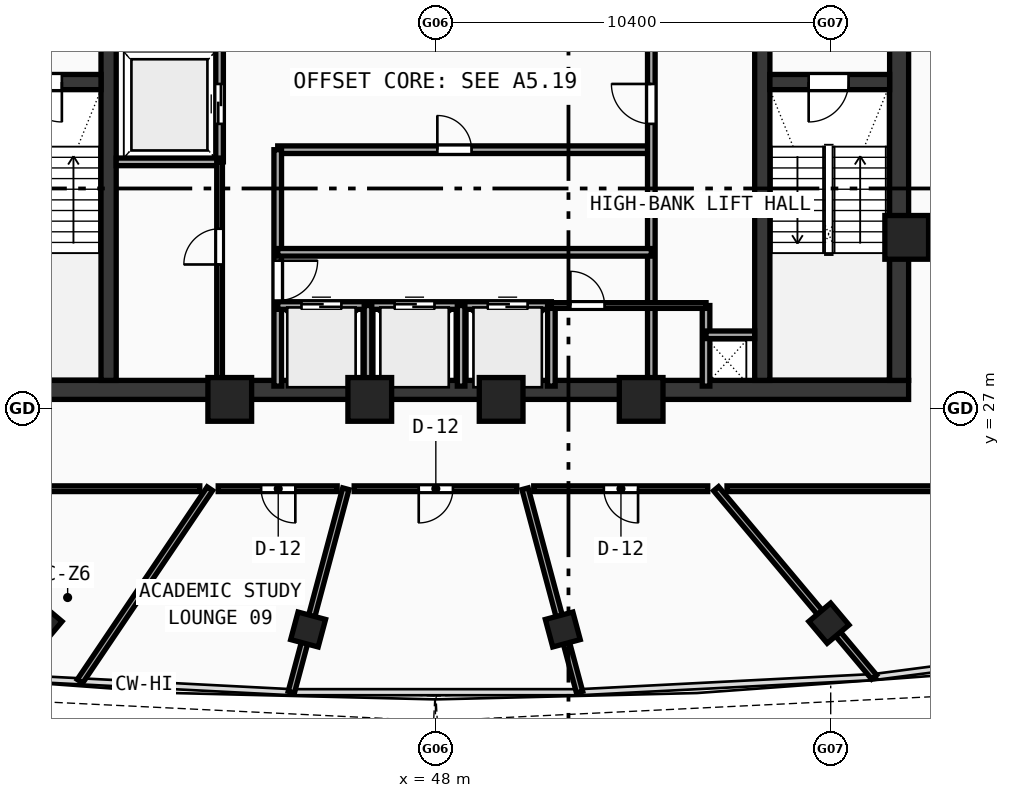
"""IFC4 building model, lengths in metres.
Left out: names, types, materials, properties, quantities, classifications, styles, units other than length and angle.
Written with IfcOpenShell. Run it as: python <this file> out.ifc"""

import sys

from ifc_helpers import new_model, si_unit, direction, frame, frame_2d, origin, origin_with_axes, origin_2d, place, context, subcontext, project, spatial, rectangle, hollow_rectangle, extrude, source, transform, mapped, element, fill, save


model = new_model("IFC4")
c1 = context("Model", 3, precision=1e-05, world=origin(), true_north=direction((0.0, 1.0)))
c2 = subcontext(c1, "Body", "Model", "MODEL_VIEW")
j1 = project(units=[si_unit("LENGTHUNIT", "METRE"), si_unit("PLANEANGLEUNIT", "RADIAN")], contexts=[c1])
p1 = place(None, origin())
s1 = spatial("IfcSite", under=j1, at=p1, CompositionType="ELEMENT")
p2 = place(p1, origin())
s2 = spatial("IfcBuilding", under=s1, at=p2, CompositionType="ELEMENT")
p3 = place(p2, frame((0.0, 0.0, 299.94)))
s3 = spatial("IfcBuildingStorey", under=s2, at=p3, CompositionType="ELEMENT", Elevation=299.94)
p4 = place(p3, frame((35.55, 27.5, 0.0), z_axis=(0.0, 0.0, 1.0), x_axis=(1.0, 0.0, 0.0)))
e1 = element("IfcWall", 1, at=p4, inside=s3, PredefinedType="SHEAR", context=c2, shape_type="SweptSolid", body=[
    extrude(rectangle(XDim=24.9, YDim=0.5, at=frame_2d((12.45, 0.0))), origin(), (0.0, 0.0, 1.0), 3.47),
])
p5 = place(p3, frame((60.2, 27.75, 0.0), z_axis=(0.0, 0.0, 1.0), x_axis=(0.0, 1.0, 0.0)))
e2 = element("IfcWall", 2, at=p5, inside=s3, PredefinedType="SHEAR", context=c2, shape_type="SweptSolid", body=[
    extrude(rectangle(XDim=12.2, YDim=0.5, at=frame_2d((6.1, 0.0))), origin(), (0.0, 0.0, 1.0), 3.47),
])
p6 = place(p3, frame((39.4, 27.75, 0.0), z_axis=(0.0, 0.0, 1.0), x_axis=(0.0, 1.0, 0.0)))
e3 = element("IfcWall", 3, at=p6, inside=s3, PredefinedType="SHEAR", context=c2, shape_type="SweptSolid", body=[
    extrude(rectangle(XDim=12.2, YDim=0.4, at=frame_2d((6.1, 0.0))), origin(), (0.0, 0.0, 1.0), 3.47),
])
p7 = place(p6, frame((10.0, 0.0, 0.0)))
e4 = element("IfcOpeningElement", 4, at=p7, cuts=e3, PredefinedType="OPENING", context=c2, shape_type="SweptSolid", body=[
    extrude(rectangle(XDim=1.1, YDim=2.1, at=frame_2d((0.55, 1.05))), frame((0.0, 0.21, 0.0), z_axis=(0.0, -1.0, 0.0), x_axis=(1.0, 0.0, 0.0)), (0.0, 0.0, 1.0), 0.42),
])
p8 = place(p3, frame((56.6, 27.75, 0.0), z_axis=(0.0, 0.0, 1.0), x_axis=(0.0, 1.0, 0.0)))
e5 = element("IfcWall", 5, at=p8, inside=s3, PredefinedType="SHEAR", context=c2, shape_type="SweptSolid", body=[
    extrude(rectangle(XDim=12.2, YDim=0.4, at=frame_2d((6.1, 0.0))), origin(), (0.0, 0.0, 1.0), 3.47),
])
p9 = place(p8, frame((10.0, 0.0, 0.0)))
e6 = element("IfcOpeningElement", 6, at=p9, cuts=e5, PredefinedType="OPENING", context=c2, shape_type="SweptSolid", body=[
    extrude(rectangle(XDim=1.1, YDim=2.1, at=frame_2d((0.55, 1.05))), frame((0.0, 0.21, 0.0), z_axis=(0.0, -1.0, 0.0), x_axis=(1.0, 0.0, 0.0)), (0.0, 0.0, 1.0), 0.42),
])
p10 = place(p3, frame((36.05, 35.6, 0.0), z_axis=(0.0, 0.0, 1.0), x_axis=(1.0, 0.0, 0.0)))
e7 = element("IfcWall", 7, at=p10, inside=s3, PredefinedType="SHEAR", context=c2, shape_type="SweptSolid", body=[
    extrude(rectangle(XDim=3.15, YDim=0.4, at=frame_2d((1.575, 0.0))), origin(), (0.0, 0.0, 1.0), 3.47),
])
p11 = place(p10, frame((1.07, 0.0, 0.0)))
e8 = element("IfcOpeningElement", 8, at=p11, cuts=e7, PredefinedType="OPENING", context=c2, shape_type="SweptSolid", body=[
    extrude(rectangle(XDim=1.05, YDim=2.1, at=frame_2d((0.525, 1.05))), frame((0.0, 0.21, 0.0), z_axis=(0.0, -1.0, 0.0), x_axis=(1.0, 0.0, 0.0)), (0.0, 0.0, 1.0), 0.42),
])
p12 = place(p3, frame((56.8, 35.6, 0.0), z_axis=(0.0, 0.0, 1.0), x_axis=(1.0, 0.0, 0.0)))
e9 = element("IfcWall", 9, at=p12, inside=s3, PredefinedType="SHEAR", context=c2, shape_type="SweptSolid", body=[
    extrude(rectangle(XDim=3.15, YDim=0.4, at=frame_2d((1.575, 0.0))), origin(), (0.0, 0.0, 1.0), 3.47),
])
p13 = place(p12, frame((1.02, 0.0, 0.0)))
e10 = element("IfcOpeningElement", 10, at=p13, cuts=e9, PredefinedType="OPENING", context=c2, shape_type="SweptSolid", body=[
    extrude(rectangle(XDim=1.05, YDim=2.1, at=frame_2d((0.525, 1.05))), frame((0.0, 0.21, 0.0), z_axis=(0.0, -1.0, 0.0), x_axis=(1.0, 0.0, 0.0)), (0.0, 0.0, 1.0), 0.42),
])
m1 = source(origin(), c2, "Body", "SweptSolid", [
    extrude(hollow_rectangle(XDim=1.15, YDim=1.15, WallThickness=0.048, at=origin_2d()), origin(), (0.0, 0.0, 1.0), 3.73),
])
for number, where, z_axis, x_axis in (
    (11, (42.588, 27.25, -0.26), (0.0, 0.0, 1.0), (1.0, 0.0, 0.0)),
    (12, (46.272, 27.25, -0.26), (0.0, 0.0, 1.0), (1.0, 0.0, 0.0)),
    (13, (49.729, 27.25, -0.26), (0.0, 0.0, 1.0), (1.0, 0.0, 0.0)),
    (14, (53.412, 27.25, -0.26), (0.0, 0.0, 1.0), (1.0, 0.0, 0.0)),
    (15, (60.4, 31.513, -0.26), (0.0, 0.0, 1.0), (1.0, 0.0, 0.0)),
):
    element("IfcColumn", number, at=place(p3, frame(where, z_axis=z_axis, x_axis=x_axis)), inside=s3, PredefinedType="COLUMN", context=c2, shape_type="MappedRepresentation", body=[
        mapped(m1, transform((0.0, 0.0, 0.0), scale=1.0)),
    ])
m2 = source(origin(), c2, "Body", "SweptSolid", [
    extrude(hollow_rectangle(XDim=0.75, YDim=0.75, WallThickness=0.028, at=origin_2d()), origin(), (0.0, 0.0, 1.0), 3.73),
])
for number, where, z_axis, x_axis in (
    (16, (37.647, 21.362, -0.26), (0.0, 0.0, 1.0), (0.766, -0.643, 0.0)),
    (17, (44.649, 21.196, -0.26), (0.0, 0.0, 1.0), (0.966, -0.259, 0.0)),
    (18, (51.351, 21.196, -0.26), (0.0, 0.0, 1.0), (0.966, 0.259, 0.0)),
    (19, (58.354, 21.362, -0.26), (0.0, 0.0, 1.0), (0.766, 0.643, 0.0)),
):
    element("IfcColumn", number, at=place(p3, frame(where, z_axis=z_axis, x_axis=x_axis)), inside=s3, PredefinedType="COLUMN", context=c2, shape_type="MappedRepresentation", body=[
        mapped(m2, transform((0.0, 0.0, 0.0), scale=1.0)),
    ])
p14 = place(p3, frame((42.32, 33.5, 0.0), z_axis=(0.0, 0.0, 1.0), x_axis=(0.0, 1.0, 0.0)))
e20 = element("IfcWall", 20, at=p14, inside=s3, PredefinedType="SOLIDWALL", context=c2, shape_type="SweptSolid", body=[
    extrude(rectangle(XDim=6.45, YDim=0.2, at=frame_2d((3.225, 0.0))), origin(), (0.0, 0.0, 1.0), 3.47),
])
p15 = place(p14, frame((1.0, 0.0, 0.0)))
e21 = element("IfcOpeningElement", 21, at=p15, cuts=e20, PredefinedType="OPENING", context=c2, shape_type="SweptSolid", body=[
    extrude(rectangle(XDim=1.05, YDim=2.1, at=frame_2d((0.525, 1.05))), frame((0.0, 0.11, 0.0), z_axis=(0.0, -1.0, 0.0), x_axis=(1.0, 0.0, 0.0)), (0.0, 0.0, 1.0), 0.22),
])
p16 = place(p3, frame((39.6, 33.5, 0.0), z_axis=(0.0, 0.0, 1.0), x_axis=(1.0, 0.0, 0.0)))
e22 = element("IfcWall", 22, at=p16, inside=s3, PredefinedType="SOLIDWALL", context=c2, shape_type="SweptSolid", body=[
    extrude(rectangle(XDim=2.72, YDim=0.2, at=frame_2d((1.36, 0.0))), origin(), (0.0, 0.0, 1.0), 3.47),
])
p17 = place(p3, frame((43.85, 33.82, 0.0), z_axis=(0.0, 0.0, 1.0), x_axis=(1.0, 0.0, 0.0)))
e23 = element("IfcWall", 23, at=p17, inside=s3, PredefinedType="SOLIDWALL", context=c2, shape_type="SweptSolid", body=[
    extrude(rectangle(XDim=9.83, YDim=0.2, at=frame_2d((4.915, 0.0))), origin(), (0.0, 0.0, 1.0), 3.47),
])
p18 = place(p17, frame((4.2, 0.0, 0.0)))
e24 = element("IfcOpeningElement", 24, at=p18, cuts=e23, PredefinedType="OPENING", context=c2, shape_type="SweptSolid", body=[
    extrude(rectangle(XDim=0.9, YDim=2.1, at=frame_2d((0.45, 1.05))), frame((0.0, 0.11, 0.0), z_axis=(0.0, -1.0, 0.0), x_axis=(1.0, 0.0, 0.0)), (0.0, 0.0, 1.0), 0.22),
])
p19 = place(p3, frame((43.85, 27.6, 0.0), z_axis=(0.0, 0.0, 1.0), x_axis=(0.0, 1.0, 0.0)))
e25 = element("IfcWall", 25, at=p19, inside=s3, PredefinedType="SOLIDWALL", context=c2, shape_type="SweptSolid", body=[
    extrude(rectangle(XDim=6.22, YDim=0.2, at=frame_2d((3.11, 0.0))), origin(), (0.0, 0.0, 1.0), 3.47),
])
p20 = place(p19, frame((2.25, 0.0, 0.0)))
e26 = element("IfcOpeningElement", 26, at=p20, cuts=e25, PredefinedType="OPENING", context=c2, shape_type="SweptSolid", body=[
    extrude(rectangle(XDim=1.05, YDim=2.1, at=frame_2d((0.525, 1.05))), frame((0.0, 0.11, 0.0), z_axis=(0.0, -1.0, 0.0), x_axis=(1.0, 0.0, 0.0)), (0.0, 0.0, 1.0), 0.22),
])
p21 = place(p3, frame((53.68, 27.6, 0.0), z_axis=(0.0, 0.0, 1.0), x_axis=(0.0, 1.0, 0.0)))
e27 = element("IfcWall", 27, at=p21, inside=s3, PredefinedType="SOLIDWALL", context=c2, shape_type="SweptSolid", body=[
    extrude(rectangle(XDim=9.05, YDim=0.2, at=frame_2d((4.525, 0.0))), origin(), (0.0, 0.0, 1.0), 3.47),
])
p22 = place(p21, frame((6.9, 0.0, 0.0)))
e28 = element("IfcOpeningElement", 28, at=p22, cuts=e27, PredefinedType="OPENING", context=c2, shape_type="SweptSolid", body=[
    extrude(rectangle(XDim=1.05, YDim=2.1, at=frame_2d((0.525, 1.05))), frame((0.0, 0.11, 0.0), z_axis=(0.0, -1.0, 0.0), x_axis=(1.0, 0.0, 0.0)), (0.0, 0.0, 1.0), 0.22),
])
p23 = place(p3, frame((43.85, 29.72, 0.0), z_axis=(0.0, 0.0, 1.0), x_axis=(1.0, 0.0, 0.0)))
e29 = element("IfcWall", 29, at=p23, inside=s3, PredefinedType="SOLIDWALL", context=c2, shape_type="SweptSolid", body=[
    extrude(rectangle(XDim=7.2, YDim=0.2, at=frame_2d((3.6, 0.0))), origin(), (0.0, 0.0, 1.0), 3.47),
])
p24 = place(p23, frame((0.625, 0.0, 0.0)))
e30 = element("IfcOpeningElement", 30, at=p24, cuts=e29, PredefinedType="OPENING", context=c2, shape_type="SweptSolid", body=[
    extrude(rectangle(XDim=1.05, YDim=2.1, at=frame_2d((0.525, 1.05))), frame((0.0, 0.11, 0.0), z_axis=(0.0, -1.0, 0.0), x_axis=(1.0, 0.0, 0.0)), (0.0, 0.0, 1.0), 0.22),
])
p25 = place(p23, frame((3.075, 0.0, 0.0)))
e31 = element("IfcOpeningElement", 31, at=p25, cuts=e29, PredefinedType="OPENING", context=c2, shape_type="SweptSolid", body=[
    extrude(rectangle(XDim=1.05, YDim=2.1, at=frame_2d((0.525, 1.05))), frame((0.0, 0.11, 0.0), z_axis=(0.0, -1.0, 0.0), x_axis=(1.0, 0.0, 0.0)), (0.0, 0.0, 1.0), 0.22),
])
p26 = place(p23, frame((5.525, 0.0, 0.0)))
e32 = element("IfcOpeningElement", 32, at=p26, cuts=e29, PredefinedType="OPENING", context=c2, shape_type="SweptSolid", body=[
    extrude(rectangle(XDim=1.05, YDim=2.1, at=frame_2d((0.525, 1.05))), frame((0.0, 0.11, 0.0), z_axis=(0.0, -1.0, 0.0), x_axis=(1.0, 0.0, 0.0)), (0.0, 0.0, 1.0), 0.22),
])
p27 = place(p3, frame((51.05, 27.6, 0.0), z_axis=(0.0, 0.0, 1.0), x_axis=(0.0, 1.0, 0.0)))
e33 = element("IfcWall", 33, at=p27, inside=s3, PredefinedType="SOLIDWALL", context=c2, shape_type="SweptSolid", body=[
    extrude(rectangle(XDim=2.12, YDim=0.2, at=frame_2d((1.06, 0.0))), origin(), (0.0, 0.0, 1.0), 3.47),
])
p28 = place(p3, frame((43.85, 31.12, 0.0), z_axis=(0.0, 0.0, 1.0), x_axis=(1.0, 0.0, 0.0)))
e34 = element("IfcWall", 34, at=p28, inside=s3, PredefinedType="SOLIDWALL", context=c2, shape_type="SweptSolid", body=[
    extrude(rectangle(XDim=9.83, YDim=0.2, at=frame_2d((4.915, 0.0))), origin(), (0.0, 0.0, 1.0), 3.47),
])
for number, where, z_axis, x_axis in (
    (35, (46.225, 27.6, 0.0), (0.0, 0.0, 1.0), (0.0, 1.0, 0.0)),
    (36, (48.675, 27.6, 0.0), (0.0, 0.0, 1.0), (0.0, 1.0, 0.0)),
    (37, (55.12, 27.6, 0.0), (0.0, 0.0, 1.0), (0.0, 1.0, 0.0)),
):
    element("IfcWall", number, at=place(p3, frame(where, z_axis=z_axis, x_axis=x_axis)), inside=s3, PredefinedType="SOLIDWALL", context=c2, shape_type="SweptSolid", body=[
        extrude(rectangle(XDim=2.12, YDim=0.2, at=frame_2d((1.06, 0.0))), origin(), (0.0, 0.0, 1.0), 3.47),
    ])
p29 = place(p3, frame((55.12, 28.95, 0.0), z_axis=(0.0, 0.0, 1.0), x_axis=(1.0, 0.0, 0.0)))
e38 = element("IfcWall", 38, at=p29, inside=s3, PredefinedType="SOLIDWALL", context=c2, shape_type="SweptSolid", body=[
    extrude(rectangle(XDim=1.28, YDim=0.2, at=frame_2d((0.64, 0.0))), origin(), (0.0, 0.0, 1.0), 3.47),
])
p30 = place(p3, frame((42.32, 27.6, 0.0), z_axis=(0.0, 0.0, 1.0), x_axis=(0.0, 1.0, 0.0)))
e39 = element("IfcWall", 39, at=p30, inside=s3, PredefinedType="PARTITIONING", context=c2, shape_type="SweptSolid", body=[
    extrude(rectangle(XDim=5.9, YDim=0.15, at=frame_2d((2.95, 0.0))), origin(), (0.0, 0.0, 1.0), 3.47),
])
p31 = place(p30, frame((3.2, 0.0, 0.0)))
e40 = element("IfcOpeningElement", 40, at=p31, cuts=e39, PredefinedType="OPENING", context=c2, shape_type="SweptSolid", body=[
    extrude(rectangle(XDim=0.94, YDim=2.1, at=frame_2d((0.47, 1.05))), frame((0.0, 0.085, 0.0), z_axis=(0.0, -1.0, 0.0), x_axis=(1.0, 0.0, 0.0)), (0.0, 0.0, 1.0), 0.17),
])
p32 = place(p3, frame((51.05, 29.72, 0.0), z_axis=(0.0, 0.0, 1.0), x_axis=(1.0, 0.0, 0.0)))
e41 = element("IfcWall", 41, at=p32, inside=s3, PredefinedType="PARTITIONING", context=c2, shape_type="SweptSolid", body=[
    extrude(rectangle(XDim=4.07, YDim=0.15, at=frame_2d((2.035, 0.0))), origin(), (0.0, 0.0, 1.0), 3.47),
])
p33 = place(p32, frame((0.5, 0.0, 0.0)))
e42 = element("IfcOpeningElement", 42, at=p33, cuts=e41, PredefinedType="OPENING", context=c2, shape_type="SweptSolid", body=[
    extrude(rectangle(XDim=0.9, YDim=2.1, at=frame_2d((0.45, 1.05))), frame((0.0, 0.085, 0.0), z_axis=(0.0, -1.0, 0.0), x_axis=(1.0, 0.0, 0.0)), (0.0, 0.0, 1.0), 0.17),
])
p34 = place(p3, frame((42.064, 24.9, 0.0), z_axis=(0.0, 0.0, 1.0), x_axis=(-0.559190191843, -0.829039401564, 0.0)))
e43 = element("IfcWall", 43, at=p34, inside=s3, PredefinedType="PARTITIONING", context=c2, shape_type="SweptSolid", body=[
    extrude(rectangle(XDim=6.112, YDim=0.17, at=frame_2d((3.056, 0.0))), origin(), (0.0, 0.0, 1.0), 2.87),
])
for number, where, z_axis, x_axis in (
    (44, (45.642, 24.9, 0.0), (0.0, 0.0, 1.0), (-0.259, -0.966, 0.0)),
    (45, (50.358, 24.9, 0.0), (0.0, 0.0, 1.0), (0.259, -0.966, 0.0)),
):
    element("IfcWall", number, at=place(p3, frame(where, z_axis=z_axis, x_axis=x_axis)), inside=s3, PredefinedType="PARTITIONING", context=c2, shape_type="SweptSolid", body=[
        extrude(rectangle(XDim=5.543, YDim=0.17, at=frame_2d((2.771, 0.0))), origin(), (0.0, 0.0, 1.0), 2.87),
    ])
p35 = place(p3, frame((55.384, 24.9, 0.0), z_axis=(0.0, 0.0, 1.0), x_axis=(0.642794522615, -0.76603864243, 0.0)))
e46 = element("IfcWall", 46, at=p35, inside=s3, PredefinedType="PARTITIONING", context=c2, shape_type="SweptSolid", body=[
    extrude(rectangle(XDim=6.468, YDim=0.17, at=frame_2d((3.234, 0.0))), origin(), (0.0, 0.0, 1.0), 2.87),
])
p36 = place(p3, frame((62.85, 24.9, 0.0), z_axis=(0.0, 0.0, 1.0), x_axis=(-1.0, 0.0, 0.0)))
e47 = element("IfcWall", 47, at=p36, inside=s3, PredefinedType="PARTITIONING", context=c2, shape_type="SweptSolid", body=[
    extrude(rectangle(XDim=7.179, YDim=0.15, at=frame_2d((3.589, 0.0))), origin(), (0.0, 0.0, 1.0), 3.12),
])
p37 = place(p3, frame((55.164, 24.9, 0.0), z_axis=(0.0, 0.0, 1.0), x_axis=(-1.0, 0.0, 0.0)))
e48 = element("IfcWall", 48, at=p37, inside=s3, PredefinedType="PARTITIONING", context=c2, shape_type="SweptSolid", body=[
    extrude(rectangle(XDim=4.579, YDim=0.15, at=frame_2d((2.289, 0.0))), origin(), (0.0, 0.0, 1.0), 3.47),
])
p38 = place(p37, frame((1.833, 0.0, 0.0)))
e49 = element("IfcOpeningElement", 49, at=p38, cuts=e48, PredefinedType="OPENING", context=c2, shape_type="SweptSolid", body=[
    extrude(rectangle(XDim=0.9, YDim=2.08, at=frame_2d((0.45, 1.04))), frame((0.0, 0.085, 0.0), z_axis=(0.0, -1.0, 0.0), x_axis=(1.0, 0.0, 0.0)), (0.0, 0.0, 1.0), 0.17),
])
p39 = place(p3, frame((50.138, 24.9, 0.0), z_axis=(0.0, 0.0, 1.0), x_axis=(-1.0, 0.0, 0.0)))
e50 = element("IfcWall", 50, at=p39, inside=s3, PredefinedType="PARTITIONING", context=c2, shape_type="SweptSolid", body=[
    extrude(rectangle(XDim=4.276, YDim=0.15, at=frame_2d((2.138, 0.0))), origin(), (0.0, 0.0, 1.0), 3.12),
])
p40 = place(p39, frame((1.678, 0.0, 0.0)))
e51 = element("IfcOpeningElement", 51, at=p40, cuts=e50, PredefinedType="OPENING", context=c2, shape_type="SweptSolid", body=[
    extrude(rectangle(XDim=0.9, YDim=2.08, at=frame_2d((0.45, 1.04))), frame((0.0, 0.085, 0.0), z_axis=(0.0, -1.0, 0.0), x_axis=(1.0, 0.0, 0.0)), (0.0, 0.0, 1.0), 0.17),
])
p41 = place(p3, frame((45.414, 24.9, 0.0), z_axis=(0.0, 0.0, 1.0), x_axis=(-1.0, 0.0, 0.0)))
e52 = element("IfcWall", 52, at=p41, inside=s3, PredefinedType="PARTITIONING", context=c2, shape_type="SweptSolid", body=[
    extrude(rectangle(XDim=3.13, YDim=0.15, at=frame_2d((1.565, 0.0))), origin(), (0.0, 0.0, 1.0), 3.47),
])
p42 = place(p41, frame((1.101, 0.0, 0.0)))
e53 = element("IfcOpeningElement", 53, at=p42, cuts=e52, PredefinedType="OPENING", context=c2, shape_type="SweptSolid", body=[
    extrude(rectangle(XDim=0.9, YDim=2.08, at=frame_2d((0.45, 1.04))), frame((0.0, 0.085, 0.0), z_axis=(0.0, -1.0, 0.0), x_axis=(1.0, 0.0, 0.0)), (0.0, 0.0, 1.0), 0.17),
])
p43 = place(p3, frame((41.799, 24.9, 0.0), z_axis=(0.0, 0.0, 1.0), x_axis=(-1.0, 0.0, 0.0)))
e54 = element("IfcWall", 54, at=p43, inside=s3, PredefinedType="PARTITIONING", context=c2, shape_type="SweptSolid", body=[
    extrude(rectangle(XDim=8.649, YDim=0.15, at=frame_2d((4.324, 0.0))), origin(), (0.0, 0.0, 1.0), 2.87),
])
p44 = place(p43, frame((3.947, 0.0, 0.0)))
e55 = element("IfcOpeningElement", 55, at=p44, cuts=e54, PredefinedType="OPENING", context=c2, shape_type="SweptSolid", body=[
    extrude(rectangle(XDim=0.98, YDim=2.12, at=frame_2d((0.49, 1.06))), frame((0.0, 0.085, 0.0), z_axis=(0.0, -1.0, 0.0), x_axis=(1.0, 0.0, 0.0)), (0.0, 0.0, 1.0), 0.17),
])
m3 = source(origin(), c2, "Body", "SweptSolid", [
    extrude(rectangle(XDim=1.05, YDim=2.1, at=frame_2d((0.525, 1.05))), frame((0.0, 0.025, 0.0), z_axis=(0.0, -1.0, 0.0), x_axis=(1.0, 0.0, 0.0)), (0.0, 0.0, 1.0), 0.05),
])
p45 = place(p11, frame((1.05, 0.0, 0.0), z_axis=(0.0, 0.0, 1.0), x_axis=(-1.0, 0.0, 0.0)))
e56 = element("IfcDoor", 56, at=p45, inside=s3, OperationType="SINGLE_SWING_LEFT", PredefinedType="DOOR", context=c2, shape_type="MappedRepresentation", body=[
    mapped(m3, transform((0.0, 0.0, 0.0), scale=1.0)),
])
fill(e8, e56)
p46 = place(p13, frame((1.05, 0.0, 0.0), z_axis=(0.0, 0.0, 1.0), x_axis=(-1.0, 0.0, 0.0)))
e57 = element("IfcDoor", 57, at=p46, inside=s3, OperationType="SINGLE_SWING_RIGHT", PredefinedType="DOOR", context=c2, shape_type="MappedRepresentation", body=[
    mapped(m3, transform((0.0, 0.0, 0.0), scale=1.0)),
])
fill(e10, e57)
p47 = place(p15, origin_with_axes())
e58 = element("IfcDoor", 58, at=p47, inside=s3, OperationType="DOUBLE_DOOR_SLIDING", PredefinedType="DOOR", context=c2, shape_type="MappedRepresentation", body=[
    mapped(m3, transform((0.0, 0.0, 0.0), scale=1.0)),
])
fill(e21, e58)
m4 = source(origin(), c2, "Body", "SweptSolid", [
    extrude(rectangle(XDim=0.9, YDim=2.1, at=frame_2d((0.45, 1.05))), frame((0.0, 0.025, 0.0), z_axis=(0.0, -1.0, 0.0), x_axis=(1.0, 0.0, 0.0)), (0.0, 0.0, 1.0), 0.05),
])
p48 = place(p18, origin_with_axes())
e59 = element("IfcDoor", 59, at=p48, inside=s3, OperationType="SINGLE_SWING_LEFT", PredefinedType="DOOR", context=c2, shape_type="MappedRepresentation", body=[
    mapped(m4, transform((0.0, 0.0, 0.0), scale=1.0)),
])
fill(e24, e59)
p49 = place(p20, frame((1.05, 0.0, 0.0), z_axis=(0.0, 0.0, 1.0), x_axis=(-1.0, 0.0, 0.0)))
e60 = element("IfcDoor", 60, at=p49, inside=s3, OperationType="SINGLE_SWING_LEFT", PredefinedType="DOOR", context=c2, shape_type="MappedRepresentation", body=[
    mapped(m3, transform((0.0, 0.0, 0.0), scale=1.0)),
])
fill(e26, e60)
p50 = place(p22, origin_with_axes())
e61 = element("IfcDoor", 61, at=p50, inside=s3, OperationType="SINGLE_SWING_RIGHT", PredefinedType="DOOR", context=c2, shape_type="MappedRepresentation", body=[
    mapped(m3, transform((0.0, 0.0, 0.0), scale=1.0)),
])
fill(e28, e61)
p51 = place(p24, origin_with_axes())
e62 = element("IfcDoor", 62, at=p51, inside=s3, OperationType="DOUBLE_DOOR_SLIDING", PredefinedType="DOOR", context=c2, shape_type="MappedRepresentation", body=[
    mapped(m3, transform((0.0, 0.0, 0.0), scale=1.0)),
])
fill(e30, e62)
p52 = place(p25, origin_with_axes())
e63 = element("IfcDoor", 63, at=p52, inside=s3, OperationType="DOUBLE_DOOR_SLIDING", PredefinedType="DOOR", context=c2, shape_type="MappedRepresentation", body=[
    mapped(m3, transform((0.0, 0.0, 0.0), scale=1.0)),
])
fill(e31, e63)
p53 = place(p26, origin_with_axes())
e64 = element("IfcDoor", 64, at=p53, inside=s3, OperationType="DOUBLE_DOOR_SLIDING", PredefinedType="DOOR", context=c2, shape_type="MappedRepresentation", body=[
    mapped(m3, transform((0.0, 0.0, 0.0), scale=1.0)),
])
fill(e32, e64)
m5 = source(origin(), c2, "Body", "SweptSolid", [
    extrude(rectangle(XDim=0.94, YDim=2.1, at=frame_2d((0.47, 1.05))), frame((0.0, 0.025, 0.0), z_axis=(0.0, -1.0, 0.0), x_axis=(1.0, 0.0, 0.0)), (0.0, 0.0, 1.0), 0.05),
])
p54 = place(p31, origin_with_axes())
e65 = element("IfcDoor", 65, at=p54, inside=s3, OperationType="SINGLE_SWING_LEFT", PredefinedType="DOOR", context=c2, shape_type="MappedRepresentation", body=[
    mapped(m5, transform((0.0, 0.0, 0.0), scale=1.0)),
])
fill(e40, e65)
p55 = place(p33, origin_with_axes())
e66 = element("IfcDoor", 66, at=p55, inside=s3, OperationType="SINGLE_SWING_LEFT", PredefinedType="DOOR", context=c2, shape_type="MappedRepresentation", body=[
    mapped(m4, transform((0.0, 0.0, 0.0), scale=1.0)),
])
fill(e42, e66)
m6 = source(origin(), c2, "Body", "SweptSolid", [
    extrude(rectangle(XDim=0.9, YDim=2.08, at=frame_2d((0.45, 1.04))), frame((0.0, 0.025, 0.0), z_axis=(0.0, -1.0, 0.0), x_axis=(1.0, 0.0, 0.0)), (0.0, 0.0, 1.0), 0.05),
])
p56 = place(p42, origin_with_axes())
e67 = element("IfcDoor", 67, at=p56, inside=s3, OperationType="SINGLE_SWING_LEFT", PredefinedType="DOOR", context=c2, shape_type="MappedRepresentation", body=[
    mapped(m6, transform((0.0, 0.0, 0.0), scale=1.0)),
])
fill(e53, e67)
p57 = place(p40, origin_with_axes())
e68 = element("IfcDoor", 68, at=p57, inside=s3, OperationType="SINGLE_SWING_RIGHT", PredefinedType="DOOR", context=c2, shape_type="MappedRepresentation", body=[
    mapped(m6, transform((0.0, 0.0, 0.0), scale=1.0)),
])
fill(e51, e68)
p58 = place(p38, origin_with_axes())
e69 = element("IfcDoor", 69, at=p58, inside=s3, OperationType="SINGLE_SWING_LEFT", PredefinedType="DOOR", context=c2, shape_type="MappedRepresentation", body=[
    mapped(m6, transform((0.0, 0.0, 0.0), scale=1.0)),
])
fill(e49, e69)
save(model, sys.argv[1])
